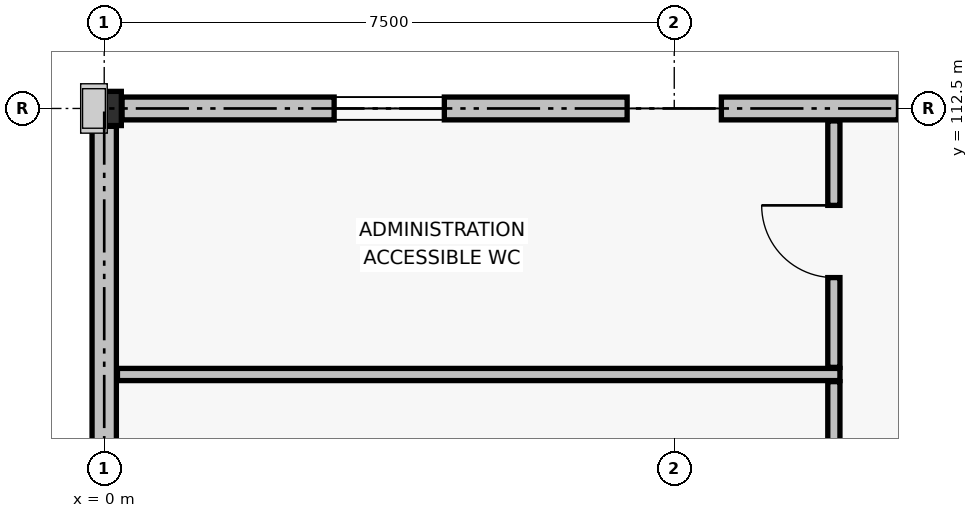
"""IFC4 building model, lengths in metres.
Left out: names, types, materials, properties, quantities, classifications, styles, units other than length and angle.
Written with IfcOpenShell. Run it as: python <this file> out.ifc"""

import sys

from ifc_helpers import new_model, si_unit, direction, frame, frame_2d, origin, origin_2d, place, context, subcontext, project, spatial, rectangle, extrude, element, fill, save


model = new_model("IFC4")
c1 = context("Model", 3, precision=1e-05, world=origin(), true_north=direction((0.0, 1.0)))
c2 = subcontext(c1, "Body", "Model", "MODEL_VIEW")
j1 = project(units=[si_unit("LENGTHUNIT", "METRE"), si_unit("PLANEANGLEUNIT", "RADIAN")], contexts=[c1])
p1 = place(None, origin())
s1 = spatial("IfcSite", under=j1, at=p1, CompositionType="ELEMENT")
p2 = place(p1, origin())
s2 = spatial("IfcBuilding", under=s1, at=p2, CompositionType="ELEMENT")
p3 = place(p2, frame((0.0, 0.0, 21.0)))
s3 = spatial("IfcBuildingStorey", under=s2, at=p3, CompositionType="ELEMENT", Elevation=21.0)
p4 = place(p3, frame((0.0, 112.5, 0.0), z_axis=(0.0, 0.0, 1.0), x_axis=(1.0, 0.0, 0.0)))
e1 = element("IfcColumn", 1, at=p4, inside=s3, PredefinedType="COLUMN", context=c2, shape_type="SweptSolid", body=[
    extrude(rectangle(XDim=0.45, YDim=0.45, at=origin_2d()), origin(), (0.0, 0.0, 1.0), 4.2),
])
p5 = place(p3, frame((0.235, 112.5, 0.0), z_axis=(0.0, 0.0, 1.0), x_axis=(1.0, 0.0, 0.0)))
e2 = element("IfcWall", 2, at=p5, inside=s3, PredefinedType="SOLIDWALL", context=c2, shape_type="SweptSolid", body=[
    extrude(rectangle(XDim=6.645, YDim=0.3, at=frame_2d((3.322, 0.0))), origin(), (0.0, 0.0, 1.0), 2.89),
])
p6 = place(p5, frame((2.79, 0.0, 0.6)))
e3 = element("IfcOpeningElement", 3, at=p6, cuts=e2, PredefinedType="OPENING", context=c2, shape_type="SweptSolid", body=[
    extrude(rectangle(XDim=1.45, YDim=1.3, at=frame_2d((0.725, 0.65))), frame((0.0, 0.16, 0.0), z_axis=(0.0, -1.0, 0.0), x_axis=(1.0, 0.0, 0.0)), (0.0, 0.0, 1.0), 0.32),
])
p7 = place(p3, frame((8.12, 112.5, 0.0), z_axis=(0.0, 0.0, 1.0), x_axis=(1.0, 0.0, 0.0)))
e4 = element("IfcWall", 4, at=p7, inside=s3, PredefinedType="SOLIDWALL", context=c2, shape_type="SweptSolid", body=[
    extrude(rectangle(XDim=6.645, YDim=0.3, at=frame_2d((3.322, 0.0))), origin(), (0.0, 0.0, 1.0), 2.89),
])
p8 = place(p7, frame((2.33, 0.0, 0.6)))
e5 = element("IfcOpeningElement", 5, at=p8, cuts=e4, PredefinedType="OPENING", context=c2, shape_type="SweptSolid", body=[
    extrude(rectangle(XDim=1.6, YDim=1.3, at=frame_2d((0.8, 0.65))), frame((0.0, 0.16, 0.0), z_axis=(0.0, -1.0, 0.0), x_axis=(1.0, 0.0, 0.0)), (0.0, 0.0, 1.0), 0.32),
])
p9 = place(p3, frame((0.0, 105.235, 0.0), z_axis=(0.0, 0.0, 1.0), x_axis=(0.0, 1.0, 0.0)))
e6 = element("IfcWall", 6, at=p9, inside=s3, PredefinedType="SOLIDWALL", context=c2, shape_type="SweptSolid", body=[
    extrude(rectangle(XDim=7.03, YDim=0.32, at=frame_2d((3.515, 0.0))), origin(), (0.0, 0.0, 1.0), 2.89),
])
p10 = place(p3, frame((0.174, 109.0, 0.0), z_axis=(0.0, 0.0, 1.0), x_axis=(1.0, 0.0, 0.0)))
e7 = element("IfcWall", 7, at=p10, inside=s3, PredefinedType="PARTITIONING", context=c2, shape_type="SweptSolid", body=[
    extrude(rectangle(XDim=9.506, YDim=0.16, at=frame_2d((4.753, 0.0))), origin(), (0.0, 0.0, 1.0), 3.14),
])
p11 = place(p3, frame((9.6, 103.294, 0.0), z_axis=(0.0, 0.0, 1.0), x_axis=(0.0, 1.0, 0.0)))
e8 = element("IfcWall", 8, at=p11, inside=s3, PredefinedType="PARTITIONING", context=c2, shape_type="SweptSolid", body=[
    extrude(rectangle(XDim=5.612, YDim=0.16, at=frame_2d((2.806, 0.0))), origin(), (0.0, 0.0, 1.0), 2.89),
])
p12 = place(p11, frame((2.356, 0.0, 0.0)))
e9 = element("IfcOpeningElement", 9, at=p12, cuts=e8, PredefinedType="OPENING", context=c2, shape_type="SweptSolid", body=[
    extrude(rectangle(XDim=0.9, YDim=2.1, at=frame_2d((0.45, 1.05))), frame((0.0, 0.09, 0.0), z_axis=(0.0, -1.0, 0.0), x_axis=(1.0, 0.0, 0.0)), (0.0, 0.0, 1.0), 0.18),
])
p13 = place(p3, frame((9.6, 109.094, 0.0), z_axis=(0.0, 0.0, 1.0), x_axis=(0.0, 1.0, 0.0)))
e10 = element("IfcWall", 10, at=p13, inside=s3, PredefinedType="PARTITIONING", context=c2, shape_type="SweptSolid", body=[
    extrude(rectangle(XDim=3.242, YDim=0.16, at=frame_2d((1.621, 0.0))), origin(), (0.0, 0.0, 1.0), 2.89),
])
p14 = place(p13, frame((1.181, 0.0, 0.0)))
e11 = element("IfcOpeningElement", 11, at=p14, cuts=e10, PredefinedType="OPENING", context=c2, shape_type="SweptSolid", body=[
    extrude(rectangle(XDim=0.95, YDim=2.1, at=frame_2d((0.475, 1.05))), frame((0.0, 0.09, 0.0), z_axis=(0.0, -1.0, 0.0), x_axis=(1.0, 0.0, 0.0)), (0.0, 0.0, 1.0), 0.18),
])
p15 = place(p6, origin())
e12 = element("IfcWindow", 12, at=p15, inside=s3, PartitioningType="SINGLE_PANEL", PredefinedType="WINDOW", context=c2, shape_type="SweptSolid", body=[
    extrude(rectangle(XDim=1.45, YDim=1.3, at=frame_2d((0.725, 0.65))), frame((0.0, 0.03, 0.0), z_axis=(0.0, -1.0, 0.0), x_axis=(1.0, 0.0, 0.0)), (0.0, 0.0, 1.0), 0.06),
])
fill(e3, e12)
p16 = place(p14, origin())
e13 = element("IfcDoor", 13, at=p16, inside=s3, OperationType="SINGLE_SWING_RIGHT", PredefinedType="DOOR", context=c2, shape_type="SweptSolid", body=[
    extrude(rectangle(XDim=0.95, YDim=2.1, at=frame_2d((0.475, 1.05))), frame((0.0, 0.025, 0.0), z_axis=(0.0, -1.0, 0.0), x_axis=(1.0, 0.0, 0.0)), (0.0, 0.0, 1.0), 0.05),
])
fill(e11, e13)
save(model, sys.argv[1])
